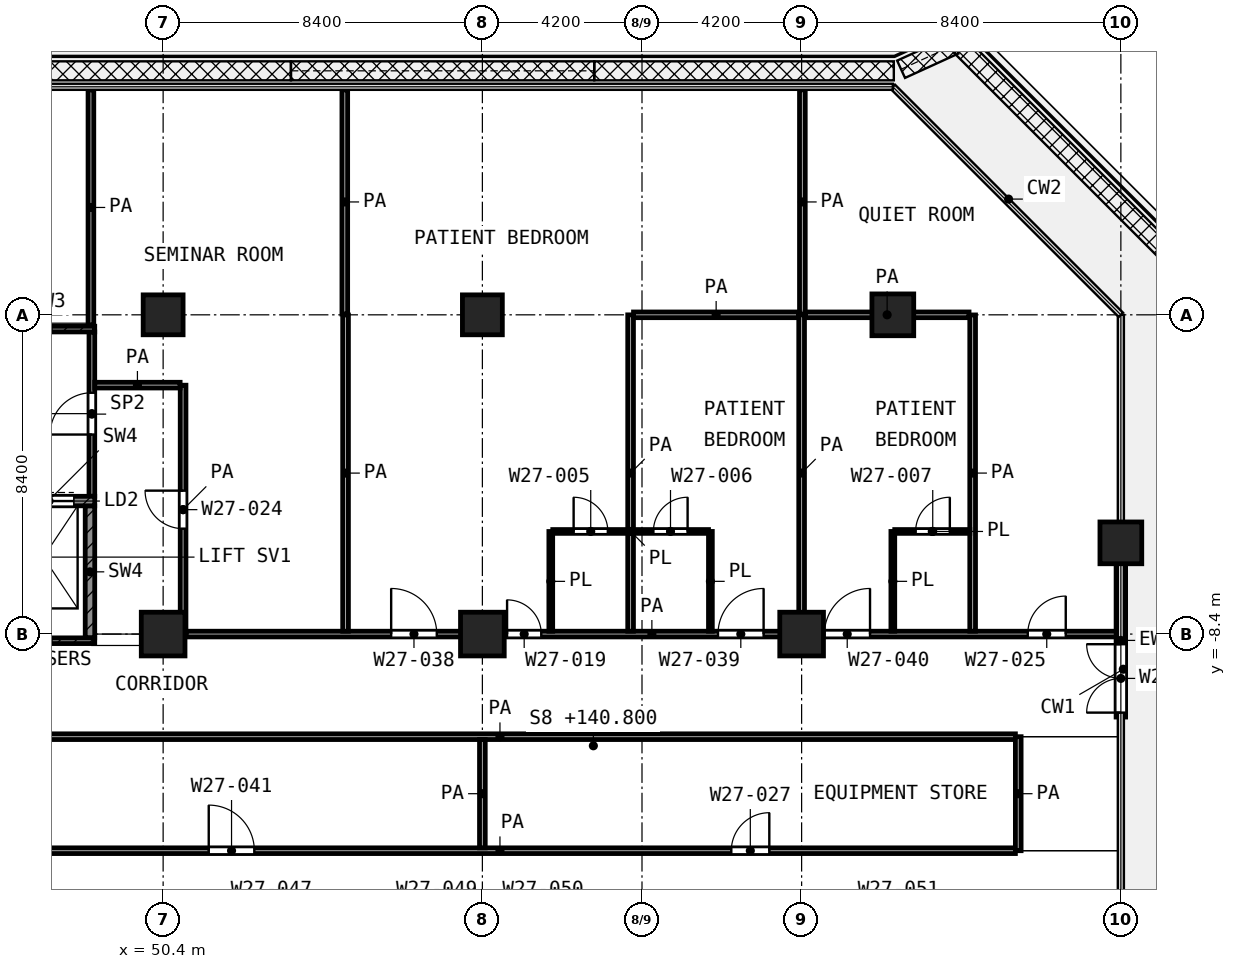
"""IFC4 building model, lengths in metres.
Left out: names, types, materials, properties, quantities, classifications, styles, units other than length and angle.
Written with IfcOpenShell. Run it as: python <this file> out.ifc"""

import sys

from ifc_helpers import new_model, si_unit, direction, frame, frame_2d, origin, origin_2d, place, context, subcontext, project, spatial, rectangle, extrude, element, fill, save


model = new_model("IFC4")
c1 = context("Model", 3, precision=1e-05, world=origin(), true_north=direction((0.0, 1.0)))
c2 = subcontext(c1, "Body", "Model", "MODEL_VIEW")
j1 = project(units=[si_unit("LENGTHUNIT", "METRE"), si_unit("PLANEANGLEUNIT", "RADIAN")], contexts=[c1])
p1 = place(None, origin())
s1 = spatial("IfcSite", under=j1, at=p1, CompositionType="ELEMENT")
p2 = place(p1, origin())
s2 = spatial("IfcBuilding", under=s1, at=p2, CompositionType="ELEMENT")
p3 = place(p2, frame((0.0, 0.0, 140.8)))
s3 = spatial("IfcBuildingStorey", under=s2, at=p3, CompositionType="ELEMENT", Elevation=140.8)
for number, where, z_axis, x_axis in (
    (1, (50.4, 0.0, 0.0), (0.0, 0.0, 1.0), (1.0, 0.0, 0.0)),
    (2, (58.8, 0.0, 0.0), (0.0, 0.0, 1.0), (1.0, 0.0, 0.0)),
):
    element("IfcColumn", number, at=place(p3, frame(where, z_axis=z_axis, x_axis=x_axis)), inside=s3, PredefinedType="COLUMN", context=c2, shape_type="SweptSolid", body=[
        extrude(rectangle(XDim=1.05, YDim=1.05, at=origin_2d()), origin(), (0.0, 0.0, 1.0), 4.2),
    ])
for number, where, z_axis, x_axis in (
    (3, (69.6, 0.0, 0.0), (0.0, 0.0, 1.0), (1.0, 0.0, 0.0)),
    (4, (75.6, -6.0, 0.0), (0.0, 0.0, 1.0), (1.0, 0.0, 0.0)),
):
    element("IfcColumn", number, at=place(p3, frame(where, z_axis=z_axis, x_axis=x_axis)), inside=s3, PredefinedType="COLUMN", context=c2, shape_type="SweptSolid", body=[
        extrude(rectangle(XDim=1.1, YDim=1.1, at=origin_2d()), origin(), (0.0, 0.0, 1.0), 4.2),
    ])
for number, where, z_axis, x_axis in (
    (5, (50.4, -8.4, 0.0), (0.0, 0.0, 1.0), (1.0, 0.0, 0.0)),
    (6, (58.8, -8.4, 0.0), (0.0, 0.0, 1.0), (1.0, 0.0, 0.0)),
    (7, (67.2, -8.4, 0.0), (0.0, 0.0, 1.0), (1.0, 0.0, 0.0)),
):
    element("IfcColumn", number, at=place(p3, frame(where, z_axis=z_axis, x_axis=x_axis)), inside=s3, PredefinedType="COLUMN", context=c2, shape_type="SweptSolid", body=[
        extrude(rectangle(XDim=1.15, YDim=1.15, at=origin_2d()), origin(), (0.0, 0.0, 1.0), 4.2),
    ])
p4 = place(p3, frame((75.6, -10.583, 0.0), z_axis=(0.0, 0.0, 1.0), x_axis=(0.0, 1.0, 0.0)))
e8 = element("IfcWall", 8, at=p4, inside=s3, PredefinedType="SOLIDWALL", context=c2, shape_type="SweptSolid", body=[
    extrude(rectangle(XDim=4.033, YDim=0.25, at=frame_2d((2.017, 0.0))), origin(), (0.0, 0.0, 1.0), 3.48),
])
p5 = place(p4, frame((0.117, 0.0, 0.0)))
e9 = element("IfcOpeningElement", 9, at=p5, cuts=e8, PredefinedType="OPENING", context=c2, shape_type="SweptSolid", body=[
    extrude(rectangle(XDim=1.8, YDim=2.1, at=frame_2d((0.9, 1.05))), frame((0.0, 0.135, 0.0), z_axis=(0.0, -1.0, 0.0), x_axis=(1.0, 0.0, 0.0)), (0.0, 0.0, 1.0), 0.27),
])
for number, where, z_axis, x_axis in (
    (10, (46.15, -0.375, 0.0), (0.0, 0.0, 1.0), (1.0, 0.0, 0.0)),
    (11, (46.15, -8.575, 0.0), (0.0, 0.0, 1.0), (1.0, 0.0, 0.0)),
):
    element("IfcWall", number, at=place(p3, frame(where, z_axis=z_axis, x_axis=x_axis)), inside=s3, PredefinedType="SHEAR", context=c2, shape_type="SweptSolid", body=[
        extrude(rectangle(XDim=2.45, YDim=0.15, at=frame_2d((1.225, 0.0))), origin(), (0.0, 0.0, 1.0), 3.6),
    ])
p6 = place(p3, frame((46.15, -4.9, 0.0), z_axis=(0.0, 0.0, 1.0), x_axis=(1.0, 0.0, 0.0)))
e12 = element("IfcWall", 12, at=p6, inside=s3, PredefinedType="SHEAR", context=c2, shape_type="SweptSolid", body=[
    extrude(rectangle(XDim=2.45, YDim=0.25, at=frame_2d((1.225, 0.0))), origin(), (0.0, 0.0, 1.0), 3.6),
])
p7 = place(p6, frame((0.6, 0.0, 0.0)))
e13 = element("IfcOpeningElement", 13, at=p7, cuts=e12, PredefinedType="OPENING", context=c2, shape_type="SweptSolid", body=[
    extrude(rectangle(XDim=1.3, YDim=2.1, at=frame_2d((0.65, 1.05))), frame((0.0, 0.135, 0.0), z_axis=(0.0, -1.0, 0.0), x_axis=(1.0, 0.0, 0.0)), (0.0, 0.0, 1.0), 0.27),
])
p8 = place(p3, frame((48.475, -8.5, 0.0), z_axis=(0.0, 0.0, 1.0), x_axis=(0.0, 1.0, 0.0)))
e14 = element("IfcWall", 14, at=p8, inside=s3, PredefinedType="SHEAR", context=c2, shape_type="SweptSolid", body=[
    extrude(rectangle(XDim=3.475, YDim=0.25, at=frame_2d((1.738, 0.0))), origin(), (0.0, 0.0, 1.0), 3.6),
])
p9 = place(p3, frame((48.525, -4.775, 0.0), z_axis=(0.0, 0.0, 1.0), x_axis=(0.0, 1.0, 0.0)))
e15 = element("IfcWall", 15, at=p9, inside=s3, PredefinedType="PARTITIONING", context=c2, shape_type="SweptSolid", body=[
    extrude(rectangle(XDim=4.325, YDim=0.15, at=frame_2d((2.163, 0.0))), origin(), (0.0, 0.0, 1.0), 3.6),
])
p10 = place(p9, frame((1.625, 0.0, 0.0)))
e16 = element("IfcOpeningElement", 16, at=p10, cuts=e15, PredefinedType="OPENING", context=c2, shape_type="SweptSolid", body=[
    extrude(rectangle(XDim=1.1, YDim=2.1, at=frame_2d((0.55, 1.05))), frame((0.0, 0.085, 0.0), z_axis=(0.0, -1.0, 0.0), x_axis=(1.0, 0.0, 0.0)), (0.0, 0.0, 1.0), 0.17),
])
p11 = place(p3, frame((60.652, -5.7, 0.0), z_axis=(0.0, 0.0, 1.0), x_axis=(1.0, 0.0, 0.0)))
e17 = element("IfcWall", 17, at=p11, inside=s3, PredefinedType="PARTITIONING", context=c2, shape_type="SweptSolid", body=[
    extrude(rectangle(XDim=4.098, YDim=0.1, at=frame_2d((2.049, 0.0))), origin(), (0.0, 0.0, 1.0), 3.6),
])
p12 = place(p11, frame((0.549, 0.0, 0.0)))
e18 = element("IfcOpeningElement", 18, at=p12, cuts=e17, PredefinedType="OPENING", context=c2, shape_type="SweptSolid", body=[
    extrude(rectangle(XDim=0.9, YDim=2.1, at=frame_2d((0.45, 1.05))), frame((0.0, 0.06, 0.0), z_axis=(0.0, -1.0, 0.0), x_axis=(1.0, 0.0, 0.0)), (0.0, 0.0, 1.0), 0.12),
])
p13 = place(p11, frame((2.648, 0.0, 0.0)))
e19 = element("IfcOpeningElement", 19, at=p13, cuts=e17, PredefinedType="OPENING", context=c2, shape_type="SweptSolid", body=[
    extrude(rectangle(XDim=0.9, YDim=2.1, at=frame_2d((0.45, 1.05))), frame((0.0, 0.06, 0.0), z_axis=(0.0, -1.0, 0.0), x_axis=(1.0, 0.0, 0.0)), (0.0, 0.0, 1.0), 0.12),
])
p14 = place(p3, frame((69.65, -5.7, 0.0), z_axis=(0.0, 0.0, 1.0), x_axis=(1.0, 0.0, 0.0)))
e20 = element("IfcWall", 20, at=p14, inside=s3, PredefinedType="PARTITIONING", context=c2, shape_type="SweptSolid", body=[
    extrude(rectangle(XDim=1.975, YDim=0.1, at=frame_2d((0.988, 0.0))), origin(), (0.0, 0.0, 1.0), 3.6),
])
p15 = place(p14, frame((0.55, 0.0, 0.0)))
e21 = element("IfcOpeningElement", 21, at=p15, cuts=e20, PredefinedType="OPENING", context=c2, shape_type="SweptSolid", body=[
    extrude(rectangle(XDim=0.9, YDim=2.1, at=frame_2d((0.45, 1.05))), frame((0.0, 0.06, 0.0), z_axis=(0.0, -1.0, 0.0), x_axis=(1.0, 0.0, 0.0)), (0.0, 0.0, 1.0), 0.12),
])
p16 = place(p3, frame((60.6, -8.325, 0.0), z_axis=(0.0, 0.0, 1.0), x_axis=(0.0, 1.0, 0.0)))
e22 = element("IfcWall", 22, at=p16, inside=s3, PredefinedType="PARTITIONING", context=c2, shape_type="SweptSolid", body=[
    extrude(rectangle(XDim=2.624, YDim=0.1, at=frame_2d((1.312, 0.0))), origin(), (0.0, 0.0, 1.0), 3.6),
])
for number, where, z_axis, x_axis in (
    (23, (64.8, -8.325, 0.0), (0.0, 0.0, 1.0), (0.0, 1.0, 0.0)),
    (24, (69.6, -8.325, 0.0), (0.0, 0.0, 1.0), (0.0, 1.0, 0.0)),
):
    element("IfcWall", number, at=place(p3, frame(where, z_axis=z_axis, x_axis=x_axis)), inside=s3, PredefinedType="PARTITIONING", context=c2, shape_type="SweptSolid", body=[
        extrude(rectangle(XDim=2.625, YDim=0.1, at=frame_2d((1.312, 0.0))), origin(), (0.0, 0.0, 1.0), 3.6),
    ])
p17 = place(p3, frame((45.7, -14.1, 0.0), z_axis=(0.0, 0.0, 1.0), x_axis=(1.0, 0.0, 0.0)))
e25 = element("IfcWall", 25, at=p17, inside=s3, PredefinedType="PARTITIONING", context=c2, shape_type="SweptSolid", body=[
    extrude(rectangle(XDim=27.125, YDim=0.15, at=frame_2d((13.562, 0.0))), origin(), (0.0, 0.0, 1.0), 3.6),
])
p18 = place(p17, frame((5.9, 0.0, 0.0)))
e26 = element("IfcOpeningElement", 26, at=p18, cuts=e25, PredefinedType="OPENING", context=c2, shape_type="SweptSolid", body=[
    extrude(rectangle(XDim=1.2, YDim=2.1, at=frame_2d((0.6, 1.05))), frame((0.0, 0.085, 0.0), z_axis=(0.0, -1.0, 0.0), x_axis=(1.0, 0.0, 0.0)), (0.0, 0.0, 1.0), 0.17),
])
p19 = place(p17, frame((19.65, 0.0, 0.0)))
e27 = element("IfcOpeningElement", 27, at=p19, cuts=e25, PredefinedType="OPENING", context=c2, shape_type="SweptSolid", body=[
    extrude(rectangle(XDim=1.0, YDim=2.1, at=frame_2d((0.5, 1.05))), frame((0.0, 0.085, 0.0), z_axis=(0.0, -1.0, 0.0), x_axis=(1.0, 0.0, 0.0)), (0.0, 0.0, 1.0), 0.17),
])
p20 = place(p3, frame((45.7, -11.1, 0.0), z_axis=(0.0, 0.0, 1.0), x_axis=(1.0, 0.0, 0.0)))
e28 = element("IfcWall", 28, at=p20, inside=s3, PredefinedType="PARTITIONING", context=c2, shape_type="SweptSolid", body=[
    extrude(rectangle(XDim=27.125, YDim=0.15, at=frame_2d((13.562, 0.0))), origin(), (0.0, 0.0, 1.0), 3.6),
])
p21 = place(p3, frame((51.0, -8.4, 0.0), z_axis=(0.0, 0.0, 1.0), x_axis=(1.0, 0.0, 0.0)))
e29 = element("IfcWall", 29, at=p21, inside=s3, PredefinedType="PARTITIONING", context=c2, shape_type="SweptSolid", body=[
    extrude(rectangle(XDim=24.52, YDim=0.15, at=frame_2d((12.26, 0.0))), origin(), (0.0, 0.0, 1.0), 3.6),
])
p22 = place(p21, frame((5.4, 0.0, 0.0)))
e30 = element("IfcOpeningElement", 30, at=p22, cuts=e29, PredefinedType="OPENING", context=c2, shape_type="SweptSolid", body=[
    extrude(rectangle(XDim=1.2, YDim=2.1, at=frame_2d((0.6, 1.05))), frame((0.0, 0.085, 0.0), z_axis=(0.0, -1.0, 0.0), x_axis=(1.0, 0.0, 0.0)), (0.0, 0.0, 1.0), 0.17),
])
p23 = place(p21, frame((8.45, 0.0, 0.0)))
e31 = element("IfcOpeningElement", 31, at=p23, cuts=e29, PredefinedType="OPENING", context=c2, shape_type="SweptSolid", body=[
    extrude(rectangle(XDim=0.9, YDim=2.1, at=frame_2d((0.45, 1.05))), frame((0.0, 0.085, 0.0), z_axis=(0.0, -1.0, 0.0), x_axis=(1.0, 0.0, 0.0)), (0.0, 0.0, 1.0), 0.17),
])
p24 = place(p21, frame((14.0, 0.0, 0.0)))
e32 = element("IfcOpeningElement", 32, at=p24, cuts=e29, PredefinedType="OPENING", context=c2, shape_type="SweptSolid", body=[
    extrude(rectangle(XDim=1.2, YDim=2.1, at=frame_2d((0.6, 1.05))), frame((0.0, 0.085, 0.0), z_axis=(0.0, -1.0, 0.0), x_axis=(1.0, 0.0, 0.0)), (0.0, 0.0, 1.0), 0.17),
])
p25 = place(p21, frame((16.8, 0.0, 0.0)))
e33 = element("IfcOpeningElement", 33, at=p25, cuts=e29, PredefinedType="OPENING", context=c2, shape_type="SweptSolid", body=[
    extrude(rectangle(XDim=1.2, YDim=2.1, at=frame_2d((0.6, 1.05))), frame((0.0, 0.085, 0.0), z_axis=(0.0, -1.0, 0.0), x_axis=(1.0, 0.0, 0.0)), (0.0, 0.0, 1.0), 0.17),
])
p26 = place(p21, frame((22.15, 0.0, 0.0)))
e34 = element("IfcOpeningElement", 34, at=p26, cuts=e29, PredefinedType="OPENING", context=c2, shape_type="SweptSolid", body=[
    extrude(rectangle(XDim=1.0, YDim=2.1, at=frame_2d((0.5, 1.05))), frame((0.0, 0.085, 0.0), z_axis=(0.0, -1.0, 0.0), x_axis=(1.0, 0.0, 0.0)), (0.0, 0.0, 1.0), 0.17),
])
p27 = place(p3, frame((48.6, -1.85, 0.0), z_axis=(0.0, 0.0, 1.0), x_axis=(1.0, 0.0, 0.0)))
e35 = element("IfcWall", 35, at=p27, inside=s3, PredefinedType="PARTITIONING", context=c2, shape_type="SweptSolid", body=[
    extrude(rectangle(XDim=2.247, YDim=0.15, at=frame_2d((1.124, 0.0))), origin(), (0.0, 0.0, 1.0), 3.6),
])
p28 = place(p3, frame((62.777, 0.0, 0.0), z_axis=(0.0, 0.0, 1.0), x_axis=(1.0, 0.0, 0.0)))
e36 = element("IfcWall", 36, at=p28, inside=s3, PredefinedType="PARTITIONING", context=c2, shape_type="SweptSolid", body=[
    extrude(rectangle(XDim=4.348, YDim=0.15, at=frame_2d((2.174, 0.0))), origin(), (0.0, 0.0, 1.0), 3.6),
])
p29 = place(p3, frame((67.295, 0.0, 0.0), z_axis=(0.0, 0.0, 1.0), x_axis=(1.0, 0.0, 0.0)))
e37 = element("IfcWall", 37, at=p29, inside=s3, PredefinedType="PARTITIONING", context=c2, shape_type="SweptSolid", body=[
    extrude(rectangle(XDim=4.31, YDim=0.15, at=frame_2d((2.155, 0.0))), origin(), (0.0, 0.0, 1.0), 3.6),
])
p30 = place(p3, frame((48.5, -0.27, 0.0), z_axis=(0.0, 0.0, 1.0), x_axis=(0.0, 1.0, 0.0)))
e38 = element("IfcWall", 38, at=p30, inside=s3, PredefinedType="PARTITIONING", context=c2, shape_type="SweptSolid", body=[
    extrude(rectangle(XDim=6.19, YDim=0.15, at=frame_2d((3.095, 0.0))), origin(), (0.0, 0.0, 1.0), 3.6),
])
p31 = place(p3, frame((50.925, -8.4, 0.0), z_axis=(0.0, 0.0, 1.0), x_axis=(0.0, 1.0, 0.0)))
e39 = element("IfcWall", 39, at=p31, inside=s3, PredefinedType="PARTITIONING", context=c2, shape_type="SweptSolid", body=[
    extrude(rectangle(XDim=6.548, YDim=0.15, at=frame_2d((3.274, 0.0))), origin(), (0.0, 0.0, 1.0), 3.6),
])
p32 = place(p31, frame((2.774, 0.0, 0.0)))
e40 = element("IfcOpeningElement", 40, at=p32, cuts=e39, PredefinedType="OPENING", context=c2, shape_type="SweptSolid", body=[
    extrude(rectangle(XDim=1.0, YDim=2.1, at=frame_2d((0.5, 1.05))), frame((0.0, 0.085, 0.0), z_axis=(0.0, -1.0, 0.0), x_axis=(1.0, 0.0, 0.0)), (0.0, 0.0, 1.0), 0.17),
])
p33 = place(p3, frame((55.18, 0.02, 0.0), z_axis=(0.0, 0.0, 1.0), x_axis=(0.0, 1.0, 0.0)))
e41 = element("IfcWall", 41, at=p33, inside=s3, PredefinedType="PARTITIONING", context=c2, shape_type="SweptSolid", body=[
    extrude(rectangle(XDim=5.9, YDim=0.15, at=frame_2d((2.95, 0.0))), origin(), (0.0, 0.0, 1.0), 3.6),
])
p34 = place(p3, frame((55.2, -8.325, 0.0), z_axis=(0.0, 0.0, 1.0), x_axis=(0.0, 1.0, 0.0)))
e42 = element("IfcWall", 42, at=p34, inside=s3, PredefinedType="PARTITIONING", context=c2, shape_type="SweptSolid", body=[
    extrude(rectangle(XDim=8.321, YDim=0.15, at=frame_2d((4.161, 0.0))), origin(), (0.0, 0.0, 1.0), 3.6),
])
p35 = place(p3, frame((58.8, -14.025, 0.0), z_axis=(0.0, 0.0, 1.0), x_axis=(0.0, 1.0, 0.0)))
e43 = element("IfcWall", 43, at=p35, inside=s3, PredefinedType="PARTITIONING", context=c2, shape_type="SweptSolid", body=[
    extrude(rectangle(XDim=2.85, YDim=0.15, at=frame_2d((1.425, 0.0))), origin(), (0.0, 0.0, 1.0), 3.6),
])
p36 = place(p3, frame((62.7, -8.325, 0.0), z_axis=(0.0, 0.0, 1.0), x_axis=(0.0, 1.0, 0.0)))
e44 = element("IfcWall", 44, at=p36, inside=s3, PredefinedType="PARTITIONING", context=c2, shape_type="SweptSolid", body=[
    extrude(rectangle(XDim=8.324, YDim=0.15, at=frame_2d((4.162, 0.0))), origin(), (0.0, 0.0, 1.0), 3.6),
])
p37 = place(p3, frame((67.2, -8.325, 0.0), z_axis=(0.0, 0.0, 1.0), x_axis=(0.0, 1.0, 0.0)))
e45 = element("IfcWall", 45, at=p37, inside=s3, PredefinedType="PARTITIONING", context=c2, shape_type="SweptSolid", body=[
    extrude(rectangle(XDim=8.325, YDim=0.15, at=frame_2d((4.163, 0.0))), origin(), (0.0, 0.0, 1.0), 3.6),
])
p38 = place(p3, frame((67.22, 0.02, 0.0), z_axis=(0.0, 0.0, 1.0), x_axis=(0.0, 1.0, 0.0)))
e46 = element("IfcWall", 46, at=p38, inside=s3, PredefinedType="PARTITIONING", context=c2, shape_type="SweptSolid", body=[
    extrude(rectangle(XDim=5.9, YDim=0.15, at=frame_2d((2.95, 0.0))), origin(), (0.0, 0.0, 1.0), 3.6),
])
p39 = place(p3, frame((71.7, -8.325, 0.0), z_axis=(0.0, 0.0, 1.0), x_axis=(0.0, 1.0, 0.0)))
e47 = element("IfcWall", 47, at=p39, inside=s3, PredefinedType="PARTITIONING", context=c2, shape_type="SweptSolid", body=[
    extrude(rectangle(XDim=8.322, YDim=0.15, at=frame_2d((4.161, 0.0))), origin(), (0.0, 0.0, 1.0), 3.6),
])
p40 = place(p3, frame((72.9, -14.1, 0.0), z_axis=(0.0, 0.0, 1.0), x_axis=(0.0, 1.0, 0.0)))
e48 = element("IfcWall", 48, at=p40, inside=s3, PredefinedType="PARTITIONING", context=c2, shape_type="SweptSolid", body=[
    extrude(rectangle(XDim=3.0, YDim=0.15, at=frame_2d((1.5, 0.0))), origin(), (0.0, 0.0, 1.0), 3.6),
])
p41 = place(p5, origin())
e49 = element("IfcDoor", 49, at=p41, inside=s3, OperationType="DOUBLE_DOOR_SINGLE_SWING", PredefinedType="DOOR", context=c2, shape_type="SweptSolid", body=[
    extrude(rectangle(XDim=1.8, YDim=2.1, at=frame_2d((0.9, 1.05))), frame((0.0, 0.025, 0.0), z_axis=(0.0, -1.0, 0.0), x_axis=(1.0, 0.0, 0.0)), (0.0, 0.0, 1.0), 0.05),
])
fill(e9, e49)
p42 = place(p7, origin())
e50 = element("IfcDoor", 50, at=p42, inside=s3, OperationType="DOUBLE_DOOR_SLIDING", PredefinedType="DOOR", context=c2, shape_type="SweptSolid", body=[
    extrude(rectangle(XDim=1.3, YDim=2.1, at=frame_2d((0.65, 1.05))), frame((0.0, 0.025, 0.0), z_axis=(0.0, -1.0, 0.0), x_axis=(1.0, 0.0, 0.0)), (0.0, 0.0, 1.0), 0.05),
])
fill(e13, e50)
p43 = place(p10, origin())
e51 = element("IfcDoor", 51, at=p43, inside=s3, OperationType="SINGLE_SWING_LEFT", PredefinedType="DOOR", context=c2, shape_type="SweptSolid", body=[
    extrude(rectangle(XDim=1.1, YDim=2.1, at=frame_2d((0.55, 1.05))), frame((0.0, 0.025, 0.0), z_axis=(0.0, -1.0, 0.0), x_axis=(1.0, 0.0, 0.0)), (0.0, 0.0, 1.0), 0.05),
])
fill(e16, e51)
p44 = place(p32, origin())
e52 = element("IfcDoor", 52, at=p44, inside=s3, OperationType="SINGLE_SWING_RIGHT", PredefinedType="DOOR", context=c2, shape_type="SweptSolid", body=[
    extrude(rectangle(XDim=1.0, YDim=2.1, at=frame_2d((0.5, 1.05))), frame((0.0, 0.025, 0.0), z_axis=(0.0, -1.0, 0.0), x_axis=(1.0, 0.0, 0.0)), (0.0, 0.0, 1.0), 0.05),
])
fill(e40, e52)
p45 = place(p22, origin())
e53 = element("IfcDoor", 53, at=p45, inside=s3, OperationType="SINGLE_SWING_LEFT", PredefinedType="DOOR", context=c2, shape_type="SweptSolid", body=[
    extrude(rectangle(XDim=1.2, YDim=2.1, at=frame_2d((0.6, 1.05))), frame((0.0, 0.025, 0.0), z_axis=(0.0, -1.0, 0.0), x_axis=(1.0, 0.0, 0.0)), (0.0, 0.0, 1.0), 0.05),
])
fill(e30, e53)
p46 = place(p23, origin())
e54 = element("IfcDoor", 54, at=p46, inside=s3, OperationType="SINGLE_SWING_LEFT", PredefinedType="DOOR", context=c2, shape_type="SweptSolid", body=[
    extrude(rectangle(XDim=0.9, YDim=2.1, at=frame_2d((0.45, 1.05))), frame((0.0, 0.025, 0.0), z_axis=(0.0, -1.0, 0.0), x_axis=(1.0, 0.0, 0.0)), (0.0, 0.0, 1.0), 0.05),
])
fill(e31, e54)
p47 = place(p12, origin())
e55 = element("IfcDoor", 55, at=p47, inside=s3, OperationType="SINGLE_SWING_LEFT", PredefinedType="DOOR", context=c2, shape_type="SweptSolid", body=[
    extrude(rectangle(XDim=0.9, YDim=2.1, at=frame_2d((0.45, 1.05))), frame((0.0, 0.025, 0.0), z_axis=(0.0, -1.0, 0.0), x_axis=(1.0, 0.0, 0.0)), (0.0, 0.0, 1.0), 0.05),
])
fill(e18, e55)
p48 = place(p24, origin())
e56 = element("IfcDoor", 56, at=p48, inside=s3, OperationType="SINGLE_SWING_RIGHT", PredefinedType="DOOR", context=c2, shape_type="SweptSolid", body=[
    extrude(rectangle(XDim=1.2, YDim=2.1, at=frame_2d((0.6, 1.05))), frame((0.0, 0.025, 0.0), z_axis=(0.0, -1.0, 0.0), x_axis=(1.0, 0.0, 0.0)), (0.0, 0.0, 1.0), 0.05),
])
fill(e32, e56)
p49 = place(p13, origin())
e57 = element("IfcDoor", 57, at=p49, inside=s3, OperationType="SINGLE_SWING_RIGHT", PredefinedType="DOOR", context=c2, shape_type="SweptSolid", body=[
    extrude(rectangle(XDim=0.9, YDim=2.1, at=frame_2d((0.45, 1.05))), frame((0.0, 0.025, 0.0), z_axis=(0.0, -1.0, 0.0), x_axis=(1.0, 0.0, 0.0)), (0.0, 0.0, 1.0), 0.05),
])
fill(e19, e57)
p50 = place(p25, origin())
e58 = element("IfcDoor", 58, at=p50, inside=s3, OperationType="SINGLE_SWING_RIGHT", PredefinedType="DOOR", context=c2, shape_type="SweptSolid", body=[
    extrude(rectangle(XDim=1.2, YDim=2.1, at=frame_2d((0.6, 1.05))), frame((0.0, 0.025, 0.0), z_axis=(0.0, -1.0, 0.0), x_axis=(1.0, 0.0, 0.0)), (0.0, 0.0, 1.0), 0.05),
])
fill(e33, e58)
p51 = place(p15, origin())
e59 = element("IfcDoor", 59, at=p51, inside=s3, OperationType="SINGLE_SWING_RIGHT", PredefinedType="DOOR", context=c2, shape_type="SweptSolid", body=[
    extrude(rectangle(XDim=0.9, YDim=2.1, at=frame_2d((0.45, 1.05))), frame((0.0, 0.025, 0.0), z_axis=(0.0, -1.0, 0.0), x_axis=(1.0, 0.0, 0.0)), (0.0, 0.0, 1.0), 0.05),
])
fill(e21, e59)
p52 = place(p26, origin())
e60 = element("IfcDoor", 60, at=p52, inside=s3, OperationType="SINGLE_SWING_RIGHT", PredefinedType="DOOR", context=c2, shape_type="SweptSolid", body=[
    extrude(rectangle(XDim=1.0, YDim=2.1, at=frame_2d((0.5, 1.05))), frame((0.0, 0.025, 0.0), z_axis=(0.0, -1.0, 0.0), x_axis=(1.0, 0.0, 0.0)), (0.0, 0.0, 1.0), 0.05),
])
fill(e34, e60)
p53 = place(p18, origin())
e61 = element("IfcDoor", 61, at=p53, inside=s3, OperationType="SINGLE_SWING_LEFT", PredefinedType="DOOR", context=c2, shape_type="SweptSolid", body=[
    extrude(rectangle(XDim=1.2, YDim=2.1, at=frame_2d((0.6, 1.05))), frame((0.0, 0.025, 0.0), z_axis=(0.0, -1.0, 0.0), x_axis=(1.0, 0.0, 0.0)), (0.0, 0.0, 1.0), 0.05),
])
fill(e26, e61)
p54 = place(p19, origin())
e62 = element("IfcDoor", 62, at=p54, inside=s3, OperationType="SINGLE_SWING_RIGHT", PredefinedType="DOOR", context=c2, shape_type="SweptSolid", body=[
    extrude(rectangle(XDim=1.0, YDim=2.1, at=frame_2d((0.5, 1.05))), frame((0.0, 0.025, 0.0), z_axis=(0.0, -1.0, 0.0), x_axis=(1.0, 0.0, 0.0)), (0.0, 0.0, 1.0), 0.05),
])
fill(e27, e62)
save(model, sys.argv[1])
